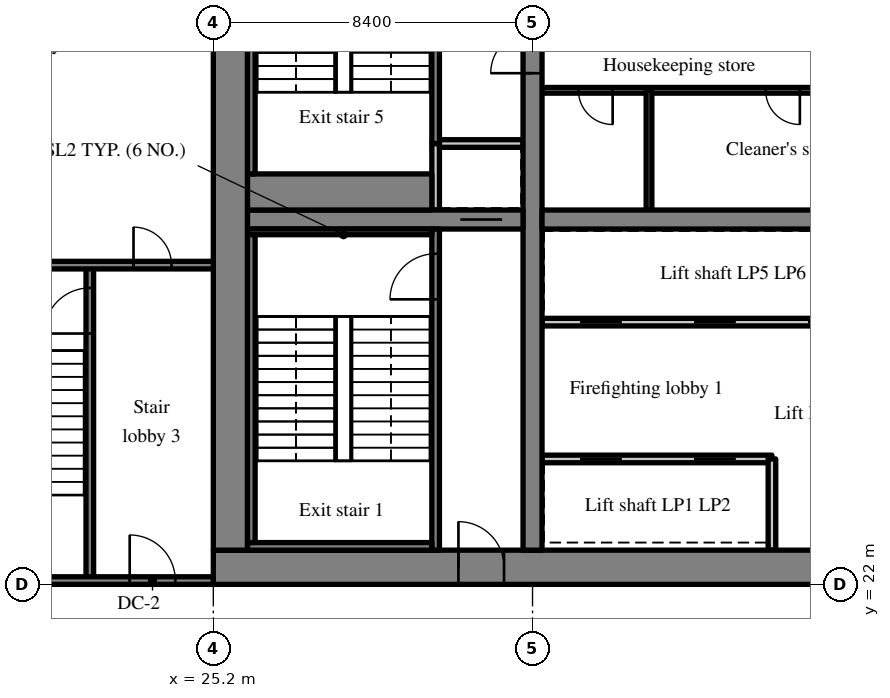
"""IFC4 building model, lengths in metres.
Left out: names, types, materials, properties, quantities, classifications, styles, units other than length and angle.
Written with IfcOpenShell. Run it as: python <this file> out.ifc"""

import sys

from ifc_helpers import new_model, si_unit, direction, frame, frame_2d, origin, place, context, subcontext, project, spatial, rectangle, extrude, source, transform, mapped, element, fill, save


model = new_model("IFC4")
c1 = context("Model", 3, precision=1e-05, world=origin(), true_north=direction((0.0, 1.0)))
c2 = subcontext(c1, "Body", "Model", "MODEL_VIEW")
j1 = project(units=[si_unit("LENGTHUNIT", "METRE"), si_unit("PLANEANGLEUNIT", "RADIAN")], contexts=[c1])
p1 = place(None, origin())
s1 = spatial("IfcSite", under=j1, at=p1, CompositionType="ELEMENT")
p2 = place(p1, origin())
s2 = spatial("IfcBuilding", under=s1, at=p2, CompositionType="ELEMENT")
p3 = place(p2, frame((0.0, 0.0, 118.0)))
s3 = spatial("IfcBuildingStorey", under=s2, at=p3, CompositionType="ELEMENT", Elevation=118.0)
m1 = source(origin(), c2, "Body", "SweptSolid", [
    extrude(rectangle(XDim=50.4, YDim=0.9, at=frame_2d((25.2, 0.0))), origin(), (0.0, 0.0, 1.0), 3.52),
])
p4 = place(p3, frame((25.2, 22.45, 0.0), z_axis=(0.0, 0.0, 1.0), x_axis=(1.0, 0.0, 0.0)))
e1 = element("IfcWall", 1, at=p4, inside=s3, PredefinedType="SHEAR", context=c2, shape_type="MappedRepresentation", body=[
    mapped(m1, transform((0.0, 0.0, 0.0), scale=1.0)),
])
m2 = source(origin(), c2, "Body", "SweptSolid", [
    extrude(rectangle(XDim=1.8, YDim=2.1, at=frame_2d((0.9, 1.05))), frame((0.0, 0.46, 0.0), z_axis=(0.0, -1.0, 0.0), x_axis=(1.0, 0.0, 0.0)), (0.0, 0.0, 1.0), 0.92),
])
p5 = place(p4, frame((15.9, 0.0, 0.0)))
e2 = element("IfcOpeningElement", 2, at=p5, cuts=e1, PredefinedType="OPENING", context=c2, shape_type="MappedRepresentation", body=[
    mapped(m2, transform((0.0, 0.0, 0.0), scale=1.0)),
])
m3 = source(origin(), c2, "Body", "SweptSolid", [
    extrude(rectangle(XDim=1.2, YDim=2.1, at=frame_2d((0.6, 1.05))), frame((0.0, 0.46, 0.0), z_axis=(0.0, -1.0, 0.0), x_axis=(1.0, 0.0, 0.0)), (0.0, 0.0, 1.0), 0.92),
])
p6 = place(p4, frame((26.975, 0.0, 0.0)))
e3 = element("IfcOpeningElement", 3, at=p6, cuts=e1, PredefinedType="OPENING", context=c2, shape_type="MappedRepresentation", body=[
    mapped(m3, transform((0.0, 0.0, 0.0), scale=1.0)),
])
m4 = source(origin(), c2, "Body", "SweptSolid", [
    extrude(rectangle(XDim=0.9, YDim=2.1, at=frame_2d((0.45, 1.05))), frame((0.0, 0.46, 0.0), z_axis=(0.0, -1.0, 0.0), x_axis=(1.0, 0.0, 0.0)), (0.0, 0.0, 1.0), 0.92),
])
p7 = place(p4, frame((33.75, 0.0, 0.0)))
e4 = element("IfcOpeningElement", 4, at=p7, cuts=e1, PredefinedType="OPENING", context=c2, shape_type="MappedRepresentation", body=[
    mapped(m4, transform((0.0, 0.0, 0.0), scale=1.0)),
])
p8 = place(p4, frame((30.75, 0.0, 0.0)))
e5 = element("IfcOpeningElement", 5, at=p8, cuts=e1, PredefinedType="OPENING", context=c2, shape_type="MappedRepresentation", body=[
    mapped(m4, transform((0.0, 0.0, 0.0), scale=1.0)),
])
p9 = place(p4, frame((39.788, 0.0, 0.0)))
e6 = element("IfcOpeningElement", 6, at=p9, cuts=e1, PredefinedType="OPENING", context=c2, shape_type="MappedRepresentation", body=[
    mapped(m4, transform((0.0, 0.0, 0.0), scale=1.0)),
])
p10 = place(p4, frame((36.762, 0.0, 0.0)))
e7 = element("IfcOpeningElement", 7, at=p10, cuts=e1, PredefinedType="OPENING", context=c2, shape_type="MappedRepresentation", body=[
    mapped(m4, transform((0.0, 0.0, 0.0), scale=1.0)),
])
p11 = place(p4, frame((6.45, 0.0, 0.0)))
e8 = element("IfcOpeningElement", 8, at=p11, cuts=e1, PredefinedType="OPENING", context=c2, shape_type="MappedRepresentation", body=[
    mapped(m3, transform((0.0, 0.0, 0.0), scale=1.0)),
])
p12 = place(p4, frame((47.775, 0.0, 0.0)))
e9 = element("IfcOpeningElement", 9, at=p12, cuts=e1, PredefinedType="OPENING", context=c2, shape_type="MappedRepresentation", body=[
    mapped(m3, transform((0.0, 0.0, 0.0), scale=1.0)),
])
m5 = source(origin(), c2, "Body", "SweptSolid", [
    extrude(rectangle(XDim=18.2, YDim=0.9, at=frame_2d((9.1, 0.0))), origin(), (0.0, 0.0, 1.0), 3.52),
])
p13 = place(p3, frame((25.65, 22.9, 0.0), z_axis=(0.0, 0.0, 1.0), x_axis=(0.0, 1.0, 0.0)))
e10 = element("IfcWall", 10, at=p13, inside=s3, PredefinedType="SHEAR", context=c2, shape_type="MappedRepresentation", body=[
    mapped(m5, transform((0.0, 0.0, 0.0), scale=1.0)),
])
m6 = source(origin(), c2, "Body", "SweptSolid", [
    extrude(rectangle(XDim=18.2, YDim=0.5, at=frame_2d((9.1, 0.0))), origin(), (0.0, 0.0, 1.0), 3.52),
])
p14 = place(p3, frame((33.6, 22.9, 0.0), z_axis=(0.0, 0.0, 1.0), x_axis=(0.0, 1.0, 0.0)))
e11 = element("IfcWall", 11, at=p14, inside=s3, PredefinedType="SHEAR", context=c2, shape_type="MappedRepresentation", body=[
    mapped(m6, transform((0.0, 0.0, 0.0), scale=1.0)),
])
m7 = source(origin(), c2, "Body", "SweptSolid", [
    extrude(rectangle(XDim=1.1, YDim=2.1, at=frame_2d((0.55, 1.05))), frame((0.0, 0.26, 0.0), z_axis=(0.0, -1.0, 0.0), x_axis=(1.0, 0.0, 0.0)), (0.0, 0.0, 1.0), 0.52),
])
p15 = place(p14, frame((12.55, 0.0, 0.0)))
e12 = element("IfcOpeningElement", 12, at=p15, cuts=e11, PredefinedType="OPENING", context=c2, shape_type="MappedRepresentation", body=[
    mapped(m7, transform((0.0, 0.0, 0.0), scale=1.0)),
])
m8 = source(origin(), c2, "Body", "SweptSolid", [
    extrude(rectangle(XDim=7.25, YDim=0.5, at=frame_2d((3.625, 0.0))), origin(), (0.0, 0.0, 1.0), 3.52),
])
p16 = place(p3, frame((26.1, 31.6, 0.0), z_axis=(0.0, 0.0, 1.0), x_axis=(1.0, 0.0, 0.0)))
e13 = element("IfcWall", 13, at=p16, inside=s3, PredefinedType="SHEAR", context=c2, shape_type="MappedRepresentation", body=[
    mapped(m8, transform((0.0, 0.0, 0.0), scale=1.0)),
])
p17 = place(p16, frame((5.6, 0.0, 0.0)))
e14 = element("IfcOpeningElement", 14, at=p17, cuts=e13, PredefinedType="OPENING", context=c2, shape_type="MappedRepresentation", body=[
    mapped(m7, transform((0.0, 0.0, 0.0), scale=1.0)),
])
m9 = source(origin(), c2, "Body", "SweptSolid", [
    extrude(rectangle(XDim=16.3, YDim=0.5, at=frame_2d((8.15, 0.0))), origin(), (0.0, 0.0, 1.0), 3.52),
])
p18 = place(p3, frame((33.85, 31.6, 0.0), z_axis=(0.0, 0.0, 1.0), x_axis=(1.0, 0.0, 0.0)))
e15 = element("IfcWall", 15, at=p18, inside=s3, PredefinedType="SHEAR", context=c2, shape_type="MappedRepresentation", body=[
    mapped(m9, transform((0.0, 0.0, 0.0), scale=1.0)),
])
m10 = source(origin(), c2, "Body", "SweptSolid", [
    extrude(rectangle(XDim=1.0, YDim=2.1, at=frame_2d((0.5, 1.05))), frame((0.0, 0.26, 0.0), z_axis=(0.0, -1.0, 0.0), x_axis=(1.0, 0.0, 0.0)), (0.0, 0.0, 1.0), 0.52),
])
p19 = place(p18, frame((14.725, 0.0, 0.0)))
e16 = element("IfcOpeningElement", 16, at=p19, cuts=e15, PredefinedType="OPENING", context=c2, shape_type="MappedRepresentation", body=[
    mapped(m10, transform((0.0, 0.0, 0.0), scale=1.0)),
])
m11 = source(origin(), c2, "Body", "SweptSolid", [
    extrude(rectangle(XDim=6.05, YDim=0.2, at=frame_2d((3.025, 0.0))), origin(), (0.0, 0.0, 1.0), 3.52),
])
p20 = place(p3, frame((33.85, 25.3, 0.0), z_axis=(0.0, 0.0, 1.0), x_axis=(1.0, 0.0, 0.0)))
e17 = element("IfcWall", 17, at=p20, inside=s3, PredefinedType="SOLIDWALL", context=c2, shape_type="MappedRepresentation", body=[
    mapped(m11, transform((0.0, 0.0, 0.0), scale=1.0)),
])
m12 = source(origin(), c2, "Body", "SweptSolid", [
    extrude(rectangle(XDim=1.1, YDim=2.1, at=frame_2d((0.55, 1.05))), frame((0.0, 0.11, 0.0), z_axis=(0.0, -1.0, 0.0), x_axis=(1.0, 0.0, 0.0)), (0.0, 0.0, 1.0), 0.22),
])
p21 = place(p20, frame((1.0, 0.0, 0.0)))
e18 = element("IfcOpeningElement", 18, at=p21, cuts=e17, PredefinedType="OPENING", context=c2, shape_type="MappedRepresentation", body=[
    mapped(m12, transform((0.0, 0.0, 0.0), scale=1.0)),
])
p22 = place(p20, frame((4.0, 0.0, 0.0)))
e19 = element("IfcOpeningElement", 19, at=p22, cuts=e17, PredefinedType="OPENING", context=c2, shape_type="MappedRepresentation", body=[
    mapped(m12, transform((0.0, 0.0, 0.0), scale=1.0)),
])
m13 = source(origin(), c2, "Body", "SweptSolid", [
    extrude(rectangle(XDim=12.05, YDim=0.2, at=frame_2d((6.025, 0.0))), origin(), (0.0, 0.0, 1.0), 3.52),
])
p23 = place(p3, frame((33.85, 28.9, 0.0), z_axis=(0.0, 0.0, 1.0), x_axis=(1.0, 0.0, 0.0)))
e20 = element("IfcWall", 20, at=p23, inside=s3, PredefinedType="SOLIDWALL", context=c2, shape_type="MappedRepresentation", body=[
    mapped(m13, transform((0.0, 0.0, 0.0), scale=1.0)),
])
p24 = place(p23, frame((1.0, 0.0, 0.0)))
e21 = element("IfcOpeningElement", 21, at=p24, cuts=e20, PredefinedType="OPENING", context=c2, shape_type="MappedRepresentation", body=[
    mapped(m12, transform((0.0, 0.0, 0.0), scale=1.0)),
])
p25 = place(p23, frame((4.0, 0.0, 0.0)))
e22 = element("IfcOpeningElement", 22, at=p25, cuts=e20, PredefinedType="OPENING", context=c2, shape_type="MappedRepresentation", body=[
    mapped(m12, transform((0.0, 0.0, 0.0), scale=1.0)),
])
p26 = place(p23, frame((7.0, 0.0, 0.0)))
e23 = element("IfcOpeningElement", 23, at=p26, cuts=e20, PredefinedType="OPENING", context=c2, shape_type="MappedRepresentation", body=[
    mapped(m12, transform((0.0, 0.0, 0.0), scale=1.0)),
])
p27 = place(p23, frame((10.0, 0.0, 0.0)))
e24 = element("IfcOpeningElement", 24, at=p27, cuts=e20, PredefinedType="OPENING", context=c2, shape_type="MappedRepresentation", body=[
    mapped(m12, transform((0.0, 0.0, 0.0), scale=1.0)),
])
m14 = source(origin(), c2, "Body", "SweptSolid", [
    extrude(rectangle(XDim=2.4, YDim=0.2, at=frame_2d((1.2, 0.0))), origin(), (0.0, 0.0, 1.0), 3.52),
])
p28 = place(p3, frame((39.9, 22.9, 0.0), z_axis=(0.0, 0.0, 1.0), x_axis=(0.0, 1.0, 0.0)))
e25 = element("IfcWall", 25, at=p28, inside=s3, PredefinedType="SOLIDWALL", context=c2, shape_type="MappedRepresentation", body=[
    mapped(m14, transform((0.0, 0.0, 0.0), scale=1.0)),
])
m15 = source(origin(), c2, "Body", "SweptSolid", [
    extrude(rectangle(XDim=14.15, YDim=0.15, at=frame_2d((7.075, 0.0))), origin(), (0.0, 0.0, 1.0), 3.52),
])
p29 = place(p3, frame((33.85, 35.0, 0.0), z_axis=(0.0, 0.0, 1.0), x_axis=(1.0, 0.0, 0.0)))
e26 = element("IfcWall", 26, at=p29, inside=s3, PredefinedType="PARTITIONING", context=c2, shape_type="MappedRepresentation", body=[
    mapped(m15, transform((0.0, 0.0, 0.0), scale=1.0)),
])
m16 = source(origin(), c2, "Body", "SweptSolid", [
    extrude(rectangle(XDim=0.9, YDim=2.1, at=frame_2d((0.45, 1.05))), frame((0.0, 0.085, 0.0), z_axis=(0.0, -1.0, 0.0), x_axis=(1.0, 0.0, 0.0)), (0.0, 0.0, 1.0), 0.17),
])
p30 = place(p29, frame((0.958, 0.0, 0.0)))
e27 = element("IfcOpeningElement", 27, at=p30, cuts=e26, PredefinedType="OPENING", context=c2, shape_type="MappedRepresentation", body=[
    mapped(m16, transform((0.0, 0.0, 0.0), scale=1.0)),
])
p31 = place(p29, frame((5.884, 0.0, 0.0)))
e28 = element("IfcOpeningElement", 28, at=p31, cuts=e26, PredefinedType="OPENING", context=c2, shape_type="MappedRepresentation", body=[
    mapped(m16, transform((0.0, 0.0, 0.0), scale=1.0)),
])
p32 = place(p29, frame((11.514, 0.0, 0.0)))
e29 = element("IfcOpeningElement", 29, at=p32, cuts=e26, PredefinedType="OPENING", context=c2, shape_type="MappedRepresentation", body=[
    mapped(m16, transform((0.0, 0.0, 0.0), scale=1.0)),
])
m17 = source(origin(), c2, "Body", "SweptSolid", [
    extrude(rectangle(XDim=3.15, YDim=0.15, at=frame_2d((1.575, 0.0))), origin(), (0.0, 0.0, 1.0), 3.52),
])
p33 = place(p3, frame((36.665, 31.85, 0.0), z_axis=(0.0, 0.0, 1.0), x_axis=(0.0, 1.0, 0.0)))
e30 = element("IfcWall", 30, at=p33, inside=s3, PredefinedType="PARTITIONING", context=c2, shape_type="MappedRepresentation", body=[
    mapped(m17, transform((0.0, 0.0, 0.0), scale=1.0)),
])
m18 = source(origin(), c2, "Body", "SweptSolid", [
    extrude(rectangle(XDim=8.45, YDim=0.2, at=frame_2d((4.225, 0.0))), origin(), (0.0, 0.0, 1.0), 3.52),
])
p34 = place(p3, frame((31.05, 22.9, 0.0), z_axis=(0.0, 0.0, 1.0), x_axis=(0.0, 1.0, 0.0)))
e31 = element("IfcWall", 31, at=p34, inside=s3, PredefinedType="SOLIDWALL", context=c2, shape_type="MappedRepresentation", body=[
    mapped(m18, transform((0.0, 0.0, 0.0), scale=1.0)),
])
m19 = source(origin(), c2, "Body", "SweptSolid", [
    extrude(rectangle(XDim=1.2, YDim=2.1, at=frame_2d((0.6, 1.05))), frame((0.0, 0.11, 0.0), z_axis=(0.0, -1.0, 0.0), x_axis=(1.0, 0.0, 0.0)), (0.0, 0.0, 1.0), 0.22),
])
p35 = place(p34, frame((6.6, 0.0, 0.0)))
e32 = element("IfcOpeningElement", 32, at=p35, cuts=e31, PredefinedType="OPENING", context=c2, shape_type="MappedRepresentation", body=[
    mapped(m19, transform((0.0, 0.0, 0.0), scale=1.0)),
])
m20 = source(origin(), c2, "Body", "SweptSolid", [
    extrude(rectangle(XDim=1.75, YDim=0.2, at=frame_2d((0.875, 0.0))), origin(), (0.0, 0.0, 1.0), 3.52),
])
p36 = place(p3, frame((31.05, 31.85, 0.0), z_axis=(0.0, 0.0, 1.0), x_axis=(0.0, 1.0, 0.0)))
e33 = element("IfcWall", 33, at=p36, inside=s3, PredefinedType="SOLIDWALL", context=c2, shape_type="MappedRepresentation", body=[
    mapped(m20, transform((0.0, 0.0, 0.0), scale=1.0)),
])
m21 = source(origin(), c2, "Body", "SweptSolid", [
    extrude(rectangle(XDim=2.2, YDim=0.2, at=frame_2d((1.1, 0.0))), origin(), (0.0, 0.0, 1.0), 3.52),
])
p37 = place(p3, frame((31.15, 33.6, 0.0), z_axis=(0.0, 0.0, 1.0), x_axis=(1.0, 0.0, 0.0)))
e34 = element("IfcWall", 34, at=p37, inside=s3, PredefinedType="SOLIDWALL", context=c2, shape_type="MappedRepresentation", body=[
    mapped(m21, transform((0.0, 0.0, 0.0), scale=1.0)),
])
m22 = source(origin(), c2, "Body", "SweptSolid", [
    extrude(rectangle(XDim=7.5, YDim=0.2, at=frame_2d((3.75, 0.0))), origin(), (0.0, 0.0, 1.0), 3.52),
])
p38 = place(p3, frame((31.05, 33.6, 0.0), z_axis=(0.0, 0.0, 1.0), x_axis=(0.0, 1.0, 0.0)))
e35 = element("IfcWall", 35, at=p38, inside=s3, PredefinedType="SOLIDWALL", context=c2, shape_type="MappedRepresentation", body=[
    mapped(m22, transform((0.0, 0.0, 0.0), scale=1.0)),
])
m23 = source(origin(), c2, "Body", "SweptSolid", [
    extrude(rectangle(XDim=1.8, YDim=2.1, at=frame_2d((0.9, 1.05))), frame((0.0, 0.11, 0.0), z_axis=(0.0, -1.0, 0.0), x_axis=(1.0, 0.0, 0.0)), (0.0, 0.0, 1.0), 0.22),
])
p39 = place(p38, frame((5.3, 0.0, 0.0)))
e36 = element("IfcOpeningElement", 36, at=p39, cuts=e35, PredefinedType="OPENING", context=c2, shape_type="MappedRepresentation", body=[
    mapped(m23, transform((0.0, 0.0, 0.0), scale=1.0)),
])
m24 = source(origin(), c2, "Body", "SweptSolid", [
    extrude(rectangle(XDim=8.3, YDim=0.2, at=frame_2d((4.15, 0.0))), origin(), (0.0, 0.0, 1.0), 3.52),
])
p40 = place(p3, frame((21.95, 22.1, 0.0), z_axis=(0.0, 0.0, 1.0), x_axis=(0.0, 1.0, 0.0)))
e37 = element("IfcWall", 37, at=p40, inside=s3, PredefinedType="SOLIDWALL", context=c2, shape_type="MappedRepresentation", body=[
    mapped(m24, transform((0.0, 0.0, 0.0), scale=1.0)),
])
p41 = place(p40, frame((6.5, 0.0, 0.0)))
e38 = element("IfcOpeningElement", 38, at=p41, cuts=e37, PredefinedType="OPENING", context=c2, shape_type="MappedRepresentation", body=[
    mapped(m19, transform((0.0, 0.0, 0.0), scale=1.0)),
])
m25 = source(origin(), c2, "Body", "SweptSolid", [
    extrude(rectangle(XDim=8.225, YDim=0.2, at=frame_2d((4.112, 0.0))), origin(), (0.0, 0.0, 1.0), 3.52),
])
p42 = place(p3, frame((16.975, 22.1, 0.0), z_axis=(0.0, 0.0, 1.0), x_axis=(1.0, 0.0, 0.0)))
e39 = element("IfcWall", 39, at=p42, inside=s3, PredefinedType="SOLIDWALL", context=c2, shape_type="MappedRepresentation", body=[
    mapped(m25, transform((0.0, 0.0, 0.0), scale=1.0)),
])
p43 = place(p42, frame((6.025, 0.0, 0.0)))
e40 = element("IfcOpeningElement", 40, at=p43, cuts=e39, PredefinedType="OPENING", context=c2, shape_type="MappedRepresentation", body=[
    mapped(m19, transform((0.0, 0.0, 0.0), scale=1.0)),
])
p44 = place(p3, frame((16.975, 30.4, 0.0), z_axis=(0.0, 0.0, 1.0), x_axis=(1.0, 0.0, 0.0)))
e41 = element("IfcWall", 41, at=p44, inside=s3, PredefinedType="SOLIDWALL", context=c2, shape_type="MappedRepresentation", body=[
    mapped(m25, transform((0.0, 0.0, 0.0), scale=1.0)),
])
m26 = source(origin(), c2, "Body", "SweptSolid", [
    extrude(rectangle(XDim=1.0, YDim=2.1, at=frame_2d((0.5, 1.05))), frame((0.0, 0.11, 0.0), z_axis=(0.0, -1.0, 0.0), x_axis=(1.0, 0.0, 0.0)), (0.0, 0.0, 1.0), 0.22),
])
p45 = place(p44, frame((6.125, 0.0, 0.0)))
e42 = element("IfcOpeningElement", 42, at=p45, cuts=e41, PredefinedType="OPENING", context=c2, shape_type="MappedRepresentation", body=[
    mapped(m26, transform((0.0, 0.0, 0.0), scale=1.0)),
])
m27 = source(origin(), c2, "Body", "SweptSolid", [
    extrude(rectangle(XDim=4.85, YDim=0.2, at=frame_2d((2.425, 0.0))), origin(), (0.0, 0.0, 1.0), 3.52),
])
p46 = place(p3, frame((26.1, 23.0, 0.0), z_axis=(0.0, 0.0, 1.0), x_axis=(1.0, 0.0, 0.0)))
e43 = element("IfcWall", 43, at=p46, inside=s3, PredefinedType="SOLIDWALL", context=c2, shape_type="MappedRepresentation", body=[
    mapped(m27, transform((0.0, 0.0, 0.0), scale=1.0)),
])
m28 = source(origin(), c2, "Body", "SweptSolid", [
    extrude(rectangle(XDim=4.85, YDim=0.15, at=frame_2d((2.425, 0.0))), origin(), (0.0, 0.0, 1.0), 3.52),
])
p47 = place(p3, frame((26.1, 31.275, 0.0), z_axis=(0.0, 0.0, 1.0), x_axis=(1.0, 0.0, 0.0)))
e44 = element("IfcWall", 44, at=p47, inside=s3, PredefinedType="SOLIDWALL", context=c2, shape_type="MappedRepresentation", body=[
    mapped(m28, transform((0.0, 0.0, 0.0), scale=1.0)),
])
m29 = source(origin(), c2, "Body", "SweptSolid", [
    extrude(rectangle(XDim=8.1, YDim=0.2, at=frame_2d((4.05, 0.0))), origin(), (0.0, 0.0, 1.0), 3.52),
])
p48 = place(p3, frame((26.2, 23.1, 0.0), z_axis=(0.0, 0.0, 1.0), x_axis=(0.0, 1.0, 0.0)))
e45 = element("IfcWall", 45, at=p48, inside=s3, PredefinedType="SOLIDWALL", context=c2, shape_type="MappedRepresentation", body=[
    mapped(m29, transform((0.0, 0.0, 0.0), scale=1.0)),
])
m30 = source(origin(), c2, "Body", "SweptSolid", [
    extrude(rectangle(XDim=4.85, YDim=0.95, at=frame_2d((2.425, 0.0))), origin(), (0.0, 0.0, 1.0), 3.52),
])
p49 = place(p3, frame((26.1, 32.325, 0.0), z_axis=(0.0, 0.0, 1.0), x_axis=(1.0, 0.0, 0.0)))
e46 = element("IfcWall", 46, at=p49, inside=s3, PredefinedType="SOLIDWALL", context=c2, shape_type="MappedRepresentation", body=[
    mapped(m30, transform((0.0, 0.0, 0.0), scale=1.0)),
])
p50 = place(p3, frame((26.2, 32.8, 0.0), z_axis=(0.0, 0.0, 1.0), x_axis=(0.0, 1.0, 0.0)))
e47 = element("IfcWall", 47, at=p50, inside=s3, PredefinedType="SOLIDWALL", context=c2, shape_type="MappedRepresentation", body=[
    mapped(m29, transform((0.0, 0.0, 0.0), scale=1.0)),
])
m31 = source(origin(), c2, "Body", "SweptSolid", [
    extrude(rectangle(XDim=1.1, YDim=2.1, at=frame_2d((0.55, 1.05))), frame((0.0, 0.025, 0.0), z_axis=(0.0, -1.0, 0.0), x_axis=(1.0, 0.0, 0.0)), (0.0, 0.0, 1.0), 0.05),
])
p51 = place(p21, origin())
e48 = element("IfcDoor", 48, at=p51, inside=s3, OperationType="SLIDING_TO_LEFT", PredefinedType="DOOR", context=c2, shape_type="MappedRepresentation", body=[
    mapped(m31, transform((0.0, 0.0, 0.0), scale=1.0)),
])
fill(e18, e48)
p52 = place(p22, origin())
e49 = element("IfcDoor", 49, at=p52, inside=s3, OperationType="SLIDING_TO_RIGHT", PredefinedType="DOOR", context=c2, shape_type="MappedRepresentation", body=[
    mapped(m31, transform((0.0, 0.0, 0.0), scale=1.0)),
])
fill(e19, e49)
p53 = place(p24, origin())
e50 = element("IfcDoor", 50, at=p53, inside=s3, OperationType="SLIDING_TO_LEFT", PredefinedType="DOOR", context=c2, shape_type="MappedRepresentation", body=[
    mapped(m31, transform((0.0, 0.0, 0.0), scale=1.0)),
])
fill(e21, e50)
p54 = place(p25, origin())
e51 = element("IfcDoor", 51, at=p54, inside=s3, OperationType="SLIDING_TO_RIGHT", PredefinedType="DOOR", context=c2, shape_type="MappedRepresentation", body=[
    mapped(m31, transform((0.0, 0.0, 0.0), scale=1.0)),
])
fill(e22, e51)
p55 = place(p26, origin())
e52 = element("IfcDoor", 52, at=p55, inside=s3, OperationType="SLIDING_TO_LEFT", PredefinedType="DOOR", context=c2, shape_type="MappedRepresentation", body=[
    mapped(m31, transform((0.0, 0.0, 0.0), scale=1.0)),
])
fill(e23, e52)
m32 = source(origin(), c2, "Body", "SweptSolid", [
    extrude(rectangle(XDim=0.9, YDim=2.1, at=frame_2d((0.45, 1.05))), frame((0.0, 0.025, 0.0), z_axis=(0.0, -1.0, 0.0), x_axis=(1.0, 0.0, 0.0)), (0.0, 0.0, 1.0), 0.05),
])
p56 = place(p30, origin())
e53 = element("IfcDoor", 53, at=p56, inside=s3, OperationType="SINGLE_SWING_RIGHT", PredefinedType="DOOR", context=c2, shape_type="MappedRepresentation", body=[
    mapped(m32, transform((0.0, 0.0, 0.0), scale=1.0)),
])
fill(e27, e53)
p57 = place(p31, origin())
e54 = element("IfcDoor", 54, at=p57, inside=s3, OperationType="SINGLE_SWING_RIGHT", PredefinedType="DOOR", context=c2, shape_type="MappedRepresentation", body=[
    mapped(m32, transform((0.0, 0.0, 0.0), scale=1.0)),
])
fill(e28, e54)
m33 = source(origin(), c2, "Body", "SweptSolid", [
    extrude(rectangle(XDim=1.2, YDim=2.1, at=frame_2d((0.6, 1.05))), frame((0.0, 0.025, 0.0), z_axis=(0.0, -1.0, 0.0), x_axis=(1.0, 0.0, 0.0)), (0.0, 0.0, 1.0), 0.05),
])
p58 = place(p35, origin())
e55 = element("IfcDoor", 55, at=p58, inside=s3, OperationType="SINGLE_SWING_LEFT", PredefinedType="DOOR", context=c2, shape_type="MappedRepresentation", body=[
    mapped(m33, transform((0.0, 0.0, 0.0), scale=1.0)),
])
fill(e32, e55)
m34 = source(origin(), c2, "Body", "SweptSolid", [
    extrude(rectangle(XDim=1.2, YDim=2.1, at=frame_2d((0.6, 1.05))), frame((0.0, 0.375, 0.0), z_axis=(0.0, -1.0, 0.0), x_axis=(1.0, 0.0, 0.0)), (0.0, 0.0, 1.0), 0.05),
])
p59 = place(p11, origin())
e56 = element("IfcDoor", 56, at=p59, inside=s3, OperationType="SINGLE_SWING_LEFT", PredefinedType="DOOR", context=c2, shape_type="MappedRepresentation", body=[
    mapped(m34, transform((0.0, 0.0, 0.0), scale=1.0)),
])
fill(e8, e56)
p60 = place(p17, origin())
e57 = element("IfcDoor", 57, at=p60, inside=s3, OperationType="SLIDING_TO_RIGHT", PredefinedType="DOOR", context=c2, shape_type="MappedRepresentation", body=[
    mapped(m31, transform((0.0, 0.0, 0.0), scale=1.0)),
])
fill(e14, e57)
p61 = place(p41, origin())
e58 = element("IfcDoor", 58, at=p61, inside=s3, OperationType="SINGLE_SWING_LEFT", PredefinedType="DOOR", context=c2, shape_type="MappedRepresentation", body=[
    mapped(m33, transform((0.0, 0.0, 0.0), scale=1.0)),
])
fill(e38, e58)
p62 = place(p43, origin())
e59 = element("IfcDoor", 59, at=p62, inside=s3, OperationType="SINGLE_SWING_LEFT", PredefinedType="DOOR", context=c2, shape_type="MappedRepresentation", body=[
    mapped(m33, transform((0.0, 0.0, 0.0), scale=1.0)),
])
fill(e40, e59)
m35 = source(origin(), c2, "Body", "SweptSolid", [
    extrude(rectangle(XDim=1.0, YDim=2.1, at=frame_2d((0.5, 1.05))), frame((0.0, 0.025, 0.0), z_axis=(0.0, -1.0, 0.0), x_axis=(1.0, 0.0, 0.0)), (0.0, 0.0, 1.0), 0.05),
])
p63 = place(p45, origin())
e60 = element("IfcDoor", 60, at=p63, inside=s3, OperationType="SINGLE_SWING_LEFT", PredefinedType="DOOR", context=c2, shape_type="MappedRepresentation", body=[
    mapped(m35, transform((0.0, 0.0, 0.0), scale=1.0)),
])
fill(e42, e60)
p64 = place(p15, origin())
e61 = element("IfcDoor", 61, at=p64, inside=s3, OperationType="SINGLE_SWING_LEFT", PredefinedType="DOOR", context=c2, shape_type="MappedRepresentation", body=[
    mapped(m31, transform((0.0, 0.0, 0.0), scale=1.0)),
])
fill(e12, e61)
save(model, sys.argv[1])
